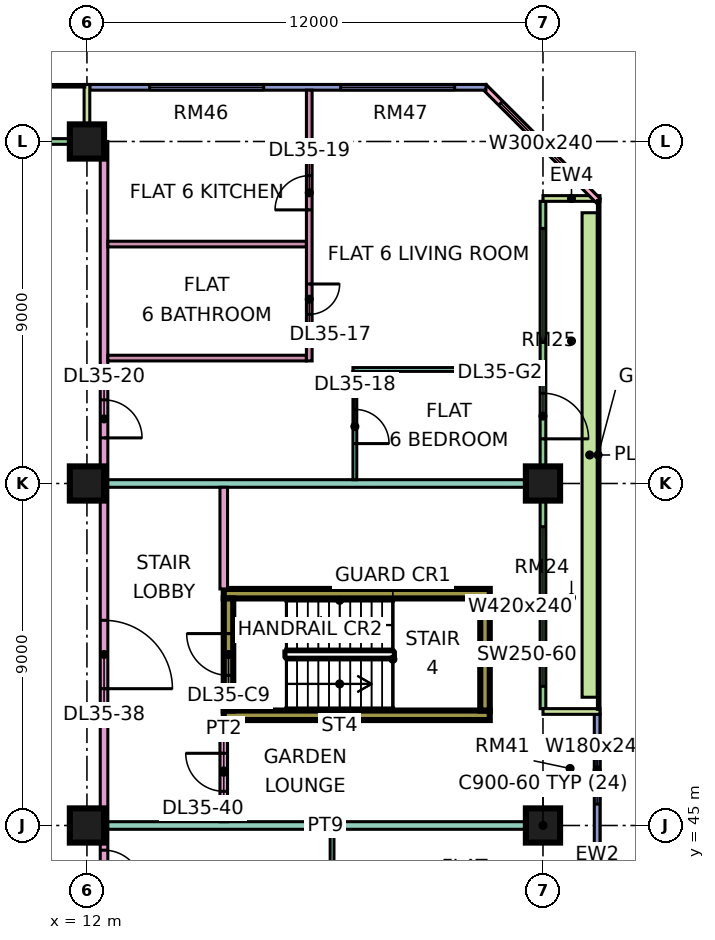
"""IFC4 building model, lengths in metres.
Left out: names, types, materials, properties, quantities, classifications, styles, units other than length and angle.
Written with IfcOpenShell. Run it as: python <this file> out.ifc"""

import sys

from ifc_helpers import new_model, si_unit, direction, frame, frame_2d, origin, origin_2d, place, context, subcontext, project, spatial, rectangle, extrude, element, fill, save


model = new_model("IFC4")
c1 = context("Model", 3, precision=1e-05, world=origin(), true_north=direction((0.0, 1.0)))
c2 = subcontext(c1, "Body", "Model", "MODEL_VIEW")
j1 = project(units=[si_unit("LENGTHUNIT", "METRE"), si_unit("PLANEANGLEUNIT", "RADIAN")], contexts=[c1])
p1 = place(None, origin())
s1 = spatial("IfcSite", under=j1, at=p1, CompositionType="ELEMENT")
p2 = place(p1, origin())
s2 = spatial("IfcBuilding", under=s1, at=p2, CompositionType="ELEMENT")
p3 = place(p2, frame((0.0, 0.0, 157.4)))
s3 = spatial("IfcBuildingStorey", under=s2, at=p3, CompositionType="ELEMENT", Elevation=157.4)
for number, where, z_axis, x_axis in (
    (1, (12.0, 45.0, 0.0), (0.0, 0.0, 1.0), (1.0, 0.0, 0.0)),
    (2, (12.0, 54.0, 0.0), (0.0, 0.0, 1.0), (1.0, 0.0, 0.0)),
    (3, (12.0, 63.0, 0.0), (0.0, 0.0, 1.0), (1.0, 0.0, 0.0)),
    (4, (24.0, 45.0, 0.0), (0.0, 0.0, 1.0), (1.0, 0.0, 0.0)),
    (5, (24.0, 54.0, 0.0), (0.0, 0.0, 1.0), (1.0, 0.0, 0.0)),
):
    element("IfcColumn", number, at=place(p3, frame(where, z_axis=z_axis, x_axis=x_axis)), inside=s3, PredefinedType="COLUMN", context=c2, shape_type="SweptSolid", body=[
        extrude(rectangle(XDim=0.9, YDim=0.9, at=origin_2d()), origin(), (0.0, 0.0, 1.0), 3.75),
    ])
for number, where, z_axis, x_axis in (
    (6, (15.6, 47.9, 0.0), (0.0, 0.0, 1.0), (1.0, 0.0, 0.0)),
    (7, (15.6, 51.1, 0.0), (0.0, 0.0, 1.0), (1.0, 0.0, 0.0)),
):
    element("IfcWall", number, at=place(p3, frame(where, z_axis=z_axis, x_axis=x_axis)), inside=s3, PredefinedType="SHEAR", context=c2, shape_type="SweptSolid", body=[
        extrude(rectangle(XDim=7.0, YDim=0.25, at=frame_2d((3.5, 0.0))), origin(), (0.0, 0.0, 1.0), 3.75),
    ])
p4 = place(p3, frame((15.725, 48.025, 0.0), z_axis=(0.0, 0.0, 1.0), x_axis=(0.0, 1.0, 0.0)))
e8 = element("IfcWall", 8, at=p4, inside=s3, PredefinedType="SHEAR", context=c2, shape_type="SweptSolid", body=[
    extrude(rectangle(XDim=2.95, YDim=0.25, at=frame_2d((1.475, 0.0))), origin(), (0.0, 0.0, 1.0), 3.75),
])
p5 = place(p4, frame((0.925, 0.0, 0.0)))
e9 = element("IfcOpeningElement", 9, at=p5, cuts=e8, PredefinedType="OPENING", context=c2, shape_type="SweptSolid", body=[
    extrude(rectangle(XDim=1.1, YDim=2.2, at=frame_2d((0.55, 1.1))), frame((0.0, 0.135, 0.0), z_axis=(0.0, -1.0, 0.0), x_axis=(1.0, 0.0, 0.0)), (0.0, 0.0, 1.0), 0.27),
])
p6 = place(p3, frame((22.475, 48.025, 0.0), z_axis=(0.0, 0.0, 1.0), x_axis=(0.0, 1.0, 0.0)))
e10 = element("IfcWall", 10, at=p6, inside=s3, PredefinedType="SHEAR", context=c2, shape_type="SweptSolid", body=[
    extrude(rectangle(XDim=2.95, YDim=0.25, at=frame_2d((1.475, 0.0))), origin(), (0.0, 0.0, 1.0), 3.75),
])
p7 = place(p3, frame((25.425, 40.5, 0.0), z_axis=(0.0, 0.0, 1.0), x_axis=(0.0, 1.0, 0.0)))
e11 = element("IfcWall", 11, at=p7, inside=s3, PredefinedType="SOLIDWALL", context=c2, shape_type="SweptSolid", body=[
    extrude(rectangle(XDim=7.425, YDim=0.15, at=frame_2d((3.712, 0.0))), origin(), (0.0, 0.0, 1.0), 3.35),
])
p8 = place(p7, frame((2.1, 0.0, 0.45)))
e12 = element("IfcOpeningElement", 12, at=p8, cuts=e11, PredefinedType="OPENING", context=c2, shape_type="SweptSolid", body=[
    extrude(rectangle(XDim=1.8, YDim=2.4, at=frame_2d((0.9, 1.2))), frame((0.0, 0.085, 0.0), z_axis=(0.0, -1.0, 0.0), x_axis=(1.0, 0.0, 0.0)), (0.0, 0.0, 1.0), 0.17),
])
p9 = place(p7, frame((5.062, 0.0, 0.45)))
e13 = element("IfcOpeningElement", 13, at=p9, cuts=e11, PredefinedType="OPENING", context=c2, shape_type="SweptSolid", body=[
    extrude(rectangle(XDim=1.8, YDim=2.4, at=frame_2d((0.9, 1.2))), frame((0.0, 0.085, 0.0), z_axis=(0.0, -1.0, 0.0), x_axis=(1.0, 0.0, 0.0)), (0.0, 0.0, 1.0), 0.17),
])
p10 = place(p3, frame((24.0, 48.075, 0.0), z_axis=(0.0, 0.0, 1.0), x_axis=(0.0, 1.0, 0.0)))
e14 = element("IfcWall", 14, at=p10, inside=s3, PredefinedType="SOLIDWALL", context=c2, shape_type="SweptSolid", body=[
    extrude(rectangle(XDim=13.35, YDim=0.15, at=frame_2d((6.675, 0.0))), origin(), (0.0, 0.0, 1.0), 3.35),
])
p11 = place(p10, frame((0.587, 0.0, 0.45)))
e15 = element("IfcOpeningElement", 15, at=p11, cuts=e14, PredefinedType="OPENING", context=c2, shape_type="SweptSolid", body=[
    extrude(rectangle(XDim=4.2, YDim=2.4, at=frame_2d((2.1, 1.2))), frame((0.0, 0.085, 0.0), z_axis=(0.0, -1.0, 0.0), x_axis=(1.0, 0.0, 0.0)), (0.0, 0.0, 1.0), 0.17),
])
p12 = place(p10, frame((7.1, 0.0, 0.0)))
e16 = element("IfcOpeningElement", 16, at=p12, cuts=e14, PredefinedType="OPENING", context=c2, shape_type="SweptSolid", body=[
    extrude(rectangle(XDim=1.2, YDim=2.4, at=frame_2d((0.6, 1.2))), frame((0.0, 0.085, 0.0), z_axis=(0.0, -1.0, 0.0), x_axis=(1.0, 0.0, 0.0)), (0.0, 0.0, 1.0), 0.17),
])
p13 = place(p10, frame((9.637, 0.0, 0.45)))
e17 = element("IfcOpeningElement", 17, at=p13, cuts=e14, PredefinedType="OPENING", context=c2, shape_type="SweptSolid", body=[
    extrude(rectangle(XDim=3.0, YDim=2.4, at=frame_2d((1.5, 1.2))), frame((0.0, 0.085, 0.0), z_axis=(0.0, -1.0, 0.0), x_axis=(1.0, 0.0, 0.0)), (0.0, 0.0, 1.0), 0.17),
])
for number, where, z_axis, x_axis in (
    (18, (25.5, 48.0, 0.0), (0.0, 0.0, 1.0), (-1.0, 0.0, 0.0)),
    (19, (25.5, 61.5, 0.0), (0.0, 0.0, 1.0), (-1.0, 0.0, 0.0)),
):
    element("IfcWall", number, at=place(p3, frame(where, z_axis=z_axis, x_axis=x_axis)), inside=s3, PredefinedType="SOLIDWALL", context=c2, shape_type="SweptSolid", body=[
        extrude(rectangle(XDim=1.5, YDim=0.15, at=frame_2d((0.75, 0.0))), origin(), (0.0, 0.0, 1.0), 3.35),
    ])
p14 = place(p3, frame((25.447, 61.447, 0.0), z_axis=(0.0, 0.0, 1.0), x_axis=(-0.707106781187, 0.707106781187, 0.0)))
e20 = element("IfcWall", 20, at=p14, inside=s3, PredefinedType="SOLIDWALL", context=c2, shape_type="SweptSolid", body=[
    extrude(rectangle(XDim=4.243, YDim=0.15, at=frame_2d((2.121, 0.0))), origin(), (0.0, 0.0, 1.0), 3.35),
])
p15 = place(p14, frame((0.621, 0.0, 0.45)))
e21 = element("IfcOpeningElement", 21, at=p15, cuts=e20, PredefinedType="OPENING", context=c2, shape_type="SweptSolid", body=[
    extrude(rectangle(XDim=3.0, YDim=2.4, at=frame_2d((1.5, 1.2))), frame((0.0, 0.085, 0.0), z_axis=(0.0, -1.0, 0.0), x_axis=(1.0, 0.0, 0.0)), (0.0, 0.0, 1.0), 0.17),
])
p16 = place(p3, frame((22.5, 64.425, 0.0), z_axis=(0.0, 0.0, 1.0), x_axis=(-1.0, 0.0, 0.0)))
e22 = element("IfcWall", 22, at=p16, inside=s3, PredefinedType="SOLIDWALL", context=c2, shape_type="SweptSolid", body=[
    extrude(rectangle(XDim=10.425, YDim=0.15, at=frame_2d((5.212, 0.0))), origin(), (0.0, 0.0, 1.0), 3.35),
])
p17 = place(p16, frame((0.825, 0.0, 0.45)))
e23 = element("IfcOpeningElement", 23, at=p17, cuts=e22, PredefinedType="OPENING", context=c2, shape_type="SweptSolid", body=[
    extrude(rectangle(XDim=3.0, YDim=2.4, at=frame_2d((1.5, 1.2))), frame((0.0, 0.085, 0.0), z_axis=(0.0, -1.0, 0.0), x_axis=(1.0, 0.0, 0.0)), (0.0, 0.0, 1.0), 0.17),
])
p18 = place(p16, frame((5.85, 0.0, 0.45)))
e24 = element("IfcOpeningElement", 24, at=p18, cuts=e22, PredefinedType="OPENING", context=c2, shape_type="SweptSolid", body=[
    extrude(rectangle(XDim=3.0, YDim=2.4, at=frame_2d((1.5, 1.2))), frame((0.0, 0.085, 0.0), z_axis=(0.0, -1.0, 0.0), x_axis=(1.0, 0.0, 0.0)), (0.0, 0.0, 1.0), 0.17),
])
p19 = place(p3, frame((11.925, 63.0, 0.0), z_axis=(0.0, 0.0, 1.0), x_axis=(-1.0, 0.0, 0.0)))
e25 = element("IfcWall", 25, at=p19, inside=s3, PredefinedType="SOLIDWALL", context=c2, shape_type="SweptSolid", body=[
    extrude(rectangle(XDim=10.35, YDim=0.15, at=frame_2d((5.175, 0.0))), origin(), (0.0, 0.0, 1.0), 3.35),
])
p20 = place(p19, frame((7.688, 0.0, 0.0)))
e26 = element("IfcOpeningElement", 26, at=p20, cuts=e25, PredefinedType="OPENING", context=c2, shape_type="SweptSolid", body=[
    extrude(rectangle(XDim=1.8, YDim=2.4, at=frame_2d((0.9, 1.2))), frame((0.0, 0.085, 0.0), z_axis=(0.0, -1.0, 0.0), x_axis=(1.0, 0.0, 0.0)), (0.0, 0.0, 1.0), 0.17),
])
p21 = place(p3, frame((12.0, 64.5, 0.0), z_axis=(0.0, 0.0, 1.0), x_axis=(0.0, -1.0, 0.0)))
e27 = element("IfcWall", 27, at=p21, inside=s3, PredefinedType="SOLIDWALL", context=c2, shape_type="SweptSolid", body=[
    extrude(rectangle(XDim=1.5, YDim=0.15, at=frame_2d((0.75, 0.0))), origin(), (0.0, 0.0, 1.0), 3.35),
])
p22 = place(p3, frame((25.229, 48.375, 0.0), z_axis=(0.0, 0.0, 1.0), x_axis=(0.0, 1.0, 0.0)))
e28 = element("IfcWall", 28, at=p22, inside=s3, PredefinedType="SOLIDWALL", context=c2, shape_type="SweptSolid", body=[
    extrude(rectangle(XDim=12.75, YDim=0.4, at=frame_2d((6.375, 0.0))), origin(), (0.0, 0.0, 1.0), 0.7),
])
p23 = place(p3, frame((12.45, 20.0, 0.0), z_axis=(0.0, 0.0, 1.0), x_axis=(0.0, 1.0, 0.0)))
e29 = element("IfcWall", 29, at=p23, inside=s3, PredefinedType="PARTITIONING", context=c2, shape_type="SweptSolid", body=[
    extrude(rectangle(XDim=43.0, YDim=0.2, at=frame_2d((21.5, 0.0))), origin(), (0.0, 0.0, 1.0), 3.35),
])
p24 = place(p23, frame((5.95, 0.0, 0.0)))
e30 = element("IfcOpeningElement", 30, at=p24, cuts=e29, PredefinedType="OPENING", context=c2, shape_type="SweptSolid", body=[
    extrude(rectangle(XDim=1.0, YDim=2.1, at=frame_2d((0.5, 1.05))), frame((0.0, 0.11, 0.0), z_axis=(0.0, -1.0, 0.0), x_axis=(1.0, 0.0, 0.0)), (0.0, 0.0, 1.0), 0.22),
])
p25 = place(p23, frame((12.0, 0.0, 0.0)))
e31 = element("IfcOpeningElement", 31, at=p25, cuts=e29, PredefinedType="OPENING", context=c2, shape_type="SweptSolid", body=[
    extrude(rectangle(XDim=1.0, YDim=2.1, at=frame_2d((0.5, 1.05))), frame((0.0, 0.11, 0.0), z_axis=(0.0, -1.0, 0.0), x_axis=(1.0, 0.0, 0.0)), (0.0, 0.0, 1.0), 0.22),
])
p26 = place(p23, frame((23.35, 0.0, 0.0)))
e32 = element("IfcOpeningElement", 32, at=p26, cuts=e29, PredefinedType="OPENING", context=c2, shape_type="SweptSolid", body=[
    extrude(rectangle(XDim=1.0, YDim=2.1, at=frame_2d((0.5, 1.05))), frame((0.0, 0.11, 0.0), z_axis=(0.0, -1.0, 0.0), x_axis=(1.0, 0.0, 0.0)), (0.0, 0.0, 1.0), 0.22),
])
p27 = place(p23, frame((35.2, 0.0, 0.0)))
e33 = element("IfcOpeningElement", 33, at=p27, cuts=e29, PredefinedType="OPENING", context=c2, shape_type="SweptSolid", body=[
    extrude(rectangle(XDim=1.0, YDim=2.1, at=frame_2d((0.5, 1.05))), frame((0.0, 0.11, 0.0), z_axis=(0.0, -1.0, 0.0), x_axis=(1.0, 0.0, 0.0)), (0.0, 0.0, 1.0), 0.22),
])
p28 = place(p23, frame((1.15, 0.0, 0.0)))
e34 = element("IfcOpeningElement", 34, at=p28, cuts=e29, PredefinedType="OPENING", context=c2, shape_type="SweptSolid", body=[
    extrude(rectangle(XDim=1.8, YDim=2.1, at=frame_2d((0.9, 1.05))), frame((0.0, 0.11, 0.0), z_axis=(0.0, -1.0, 0.0), x_axis=(1.0, 0.0, 0.0)), (0.0, 0.0, 1.0), 0.22),
])
p29 = place(p23, frame((28.6, 0.0, 0.0)))
e35 = element("IfcOpeningElement", 35, at=p29, cuts=e29, PredefinedType="OPENING", context=c2, shape_type="SweptSolid", body=[
    extrude(rectangle(XDim=1.8, YDim=2.1, at=frame_2d((0.9, 1.05))), frame((0.0, 0.11, 0.0), z_axis=(0.0, -1.0, 0.0), x_axis=(1.0, 0.0, 0.0)), (0.0, 0.0, 1.0), 0.22),
])
p30 = place(p3, frame((12.55, 45.0, 0.0), z_axis=(0.0, 0.0, 1.0), x_axis=(1.0, 0.0, 0.0)))
e36 = element("IfcWall", 36, at=p30, inside=s3, PredefinedType="PARTITIONING", context=c2, shape_type="SweptSolid", body=[
    extrude(rectangle(XDim=11.45, YDim=0.2, at=frame_2d((5.725, 0.0))), origin(), (0.0, 0.0, 1.0), 3.35),
])
p31 = place(p3, frame((12.55, 54.0, 0.0), z_axis=(0.0, 0.0, 1.0), x_axis=(1.0, 0.0, 0.0)))
e37 = element("IfcWall", 37, at=p31, inside=s3, PredefinedType="PARTITIONING", context=c2, shape_type="SweptSolid", body=[
    extrude(rectangle(XDim=11.376, YDim=0.2, at=frame_2d((5.688, 0.0))), origin(), (0.0, 0.0, 1.0), 3.35),
])
for number, where, z_axis, x_axis in (
    (38, (12.55, 57.3, 0.0), (0.0, 0.0, 1.0), (1.0, 0.0, 0.0)),
    (39, (12.55, 60.3, 0.0), (0.0, 0.0, 1.0), (1.0, 0.0, 0.0)),
):
    element("IfcWall", number, at=place(p3, frame(where, z_axis=z_axis, x_axis=x_axis)), inside=s3, PredefinedType="PARTITIONING", context=c2, shape_type="SweptSolid", body=[
        extrude(rectangle(XDim=5.225, YDim=0.15, at=frame_2d((2.612, 0.0))), origin(), (0.0, 0.0, 1.0), 3.35),
    ])
p32 = place(p3, frame((15.6, 45.1, 0.0), z_axis=(0.0, 0.0, 1.0), x_axis=(0.0, 1.0, 0.0)))
e40 = element("IfcWall", 40, at=p32, inside=s3, PredefinedType="PARTITIONING", context=c2, shape_type="SweptSolid", body=[
    extrude(rectangle(XDim=2.675, YDim=0.2, at=frame_2d((1.337, 0.0))), origin(), (0.0, 0.0, 1.0), 3.35),
])
p33 = place(p32, frame((0.8, 0.0, 0.0)))
e41 = element("IfcOpeningElement", 41, at=p33, cuts=e40, PredefinedType="OPENING", context=c2, shape_type="SweptSolid", body=[
    extrude(rectangle(XDim=1.0, YDim=2.1, at=frame_2d((0.5, 1.05))), frame((0.0, 0.11, 0.0), z_axis=(0.0, -1.0, 0.0), x_axis=(1.0, 0.0, 0.0)), (0.0, 0.0, 1.0), 0.22),
])
p34 = place(p3, frame((15.6, 51.225, 0.0), z_axis=(0.0, 0.0, 1.0), x_axis=(0.0, 1.0, 0.0)))
e42 = element("IfcWall", 42, at=p34, inside=s3, PredefinedType="PARTITIONING", context=c2, shape_type="SweptSolid", body=[
    extrude(rectangle(XDim=2.675, YDim=0.2, at=frame_2d((1.337, 0.0))), origin(), (0.0, 0.0, 1.0), 3.35),
])
p35 = place(p3, frame((17.85, 57.225, 0.0), z_axis=(0.0, 0.0, 1.0), x_axis=(0.0, 1.0, 0.0)))
e43 = element("IfcWall", 43, at=p35, inside=s3, PredefinedType="PARTITIONING", context=c2, shape_type="SweptSolid", body=[
    extrude(rectangle(XDim=7.125, YDim=0.15, at=frame_2d((3.562, 0.0))), origin(), (0.0, 0.0, 1.0), 3.35),
])
p36 = place(p35, frame((1.225, 0.0, 0.0)))
e44 = element("IfcOpeningElement", 44, at=p36, cuts=e43, PredefinedType="OPENING", context=c2, shape_type="SweptSolid", body=[
    extrude(rectangle(XDim=0.8, YDim=2.1, at=frame_2d((0.4, 1.05))), frame((0.0, 0.085, 0.0), z_axis=(0.0, -1.0, 0.0), x_axis=(1.0, 0.0, 0.0)), (0.0, 0.0, 1.0), 0.17),
])
p37 = place(p35, frame((3.975, 0.0, 0.0)))
e45 = element("IfcOpeningElement", 45, at=p37, cuts=e43, PredefinedType="OPENING", context=c2, shape_type="SweptSolid", body=[
    extrude(rectangle(XDim=0.9, YDim=2.1, at=frame_2d((0.45, 1.05))), frame((0.0, 0.085, 0.0), z_axis=(0.0, -1.0, 0.0), x_axis=(1.0, 0.0, 0.0)), (0.0, 0.0, 1.0), 0.17),
])
p38 = place(p3, frame((18.45, 42.05, 0.0), z_axis=(0.0, 0.0, 1.0), x_axis=(0.0, 1.0, 0.0)))
e46 = element("IfcWall", 46, at=p38, inside=s3, PredefinedType="PARTITIONING", context=c2, shape_type="SweptSolid", body=[
    extrude(rectangle(XDim=2.85, YDim=0.1, at=frame_2d((1.425, 0.0))), origin(), (0.0, 0.0, 1.0), 3.35),
])
p39 = place(p38, frame((1.0, 0.0, 0.0)))
e47 = element("IfcOpeningElement", 47, at=p39, cuts=e46, PredefinedType="OPENING", context=c2, shape_type="SweptSolid", body=[
    extrude(rectangle(XDim=0.9, YDim=2.1, at=frame_2d((0.45, 1.05))), frame((0.0, 0.06, 0.0), z_axis=(0.0, -1.0, 0.0), x_axis=(1.0, 0.0, 0.0)), (0.0, 0.0, 1.0), 0.12),
])
p40 = place(p3, frame((19.0, 57.0, 0.0), z_axis=(0.0, 0.0, 1.0), x_axis=(1.0, 0.0, 0.0)))
e48 = element("IfcWall", 48, at=p40, inside=s3, PredefinedType="PARTITIONING", context=c2, shape_type="SweptSolid", body=[
    extrude(rectangle(XDim=4.926, YDim=0.1, at=frame_2d((2.463, 0.0))), origin(), (0.0, 0.0, 1.0), 3.35),
])
p41 = place(p3, frame((19.05, 54.1, 0.0), z_axis=(0.0, 0.0, 1.0), x_axis=(0.0, 1.0, 0.0)))
e49 = element("IfcWall", 49, at=p41, inside=s3, PredefinedType="PARTITIONING", context=c2, shape_type="SweptSolid", body=[
    extrude(rectangle(XDim=2.85, YDim=0.1, at=frame_2d((1.425, 0.0))), origin(), (0.0, 0.0, 1.0), 3.35),
])
p42 = place(p41, frame((0.95, 0.0, 0.0)))
e50 = element("IfcOpeningElement", 50, at=p42, cuts=e49, PredefinedType="OPENING", context=c2, shape_type="SweptSolid", body=[
    extrude(rectangle(XDim=0.9, YDim=2.1, at=frame_2d((0.45, 1.05))), frame((0.0, 0.06, 0.0), z_axis=(0.0, -1.0, 0.0), x_axis=(1.0, 0.0, 0.0)), (0.0, 0.0, 1.0), 0.12),
])
p43 = place(p8, origin())
e51 = element("IfcWindow", 51, at=p43, inside=s3, PartitioningType="SINGLE_PANEL", PredefinedType="WINDOW", context=c2, shape_type="SweptSolid", body=[
    extrude(rectangle(XDim=1.8, YDim=2.4, at=frame_2d((0.9, 1.2))), frame((0.0, 0.03, 0.0), z_axis=(0.0, -1.0, 0.0), x_axis=(1.0, 0.0, 0.0)), (0.0, 0.0, 1.0), 0.06),
])
fill(e12, e51)
p44 = place(p9, origin())
e52 = element("IfcWindow", 52, at=p44, inside=s3, PartitioningType="SINGLE_PANEL", PredefinedType="WINDOW", context=c2, shape_type="SweptSolid", body=[
    extrude(rectangle(XDim=1.8, YDim=2.4, at=frame_2d((0.9, 1.2))), frame((0.0, 0.03, 0.0), z_axis=(0.0, -1.0, 0.0), x_axis=(1.0, 0.0, 0.0)), (0.0, 0.0, 1.0), 0.06),
])
fill(e13, e52)
p45 = place(p11, origin())
e53 = element("IfcWindow", 53, at=p45, inside=s3, PartitioningType="SINGLE_PANEL", PredefinedType="WINDOW", context=c2, shape_type="SweptSolid", body=[
    extrude(rectangle(XDim=4.2, YDim=2.4, at=frame_2d((2.1, 1.2))), frame((0.0, 0.03, 0.0), z_axis=(0.0, -1.0, 0.0), x_axis=(1.0, 0.0, 0.0)), (0.0, 0.0, 1.0), 0.06),
])
fill(e15, e53)
p46 = place(p12, frame((1.2, 0.0, 0.0), z_axis=(0.0, 0.0, 1.0), x_axis=(-1.0, 0.0, 0.0)))
e54 = element("IfcDoor", 54, at=p46, inside=s3, OperationType="DOUBLE_DOOR_SINGLE_SWING", PredefinedType="DOOR", context=c2, shape_type="SweptSolid", body=[
    extrude(rectangle(XDim=1.2, YDim=2.4, at=frame_2d((0.6, 1.2))), frame((0.0, 0.025, 0.0), z_axis=(0.0, -1.0, 0.0), x_axis=(1.0, 0.0, 0.0)), (0.0, 0.0, 1.0), 0.05),
])
fill(e16, e54)
p47 = place(p13, origin())
e55 = element("IfcWindow", 55, at=p47, inside=s3, PartitioningType="SINGLE_PANEL", PredefinedType="WINDOW", context=c2, shape_type="SweptSolid", body=[
    extrude(rectangle(XDim=3.0, YDim=2.4, at=frame_2d((1.5, 1.2))), frame((0.0, 0.03, 0.0), z_axis=(0.0, -1.0, 0.0), x_axis=(1.0, 0.0, 0.0)), (0.0, 0.0, 1.0), 0.06),
])
fill(e17, e55)
p48 = place(p15, origin())
e56 = element("IfcWindow", 56, at=p48, inside=s3, PartitioningType="SINGLE_PANEL", PredefinedType="WINDOW", context=c2, shape_type="SweptSolid", body=[
    extrude(rectangle(XDim=3.0, YDim=2.4, at=frame_2d((1.5, 1.2))), frame((0.0, 0.03, 0.0), z_axis=(0.0, -1.0, 0.0), x_axis=(1.0, 0.0, 0.0)), (0.0, 0.0, 1.0), 0.06),
])
fill(e21, e56)
p49 = place(p17, origin())
e57 = element("IfcWindow", 57, at=p49, inside=s3, PartitioningType="SINGLE_PANEL", PredefinedType="WINDOW", context=c2, shape_type="SweptSolid", body=[
    extrude(rectangle(XDim=3.0, YDim=2.4, at=frame_2d((1.5, 1.2))), frame((0.0, 0.03, 0.0), z_axis=(0.0, -1.0, 0.0), x_axis=(1.0, 0.0, 0.0)), (0.0, 0.0, 1.0), 0.06),
])
fill(e23, e57)
p50 = place(p18, origin())
e58 = element("IfcWindow", 58, at=p50, inside=s3, PartitioningType="SINGLE_PANEL", PredefinedType="WINDOW", context=c2, shape_type="SweptSolid", body=[
    extrude(rectangle(XDim=3.0, YDim=2.4, at=frame_2d((1.5, 1.2))), frame((0.0, 0.03, 0.0), z_axis=(0.0, -1.0, 0.0), x_axis=(1.0, 0.0, 0.0)), (0.0, 0.0, 1.0), 0.06),
])
fill(e24, e58)
p51 = place(p5, frame((1.1, 0.0, 0.0), z_axis=(0.0, 0.0, 1.0), x_axis=(-1.0, 0.0, 0.0)))
e59 = element("IfcDoor", 59, at=p51, inside=s3, OperationType="SINGLE_SWING_RIGHT", PredefinedType="DOOR", context=c2, shape_type="SweptSolid", body=[
    extrude(rectangle(XDim=1.1, YDim=2.2, at=frame_2d((0.55, 1.1))), frame((0.0, 0.025, 0.0), z_axis=(0.0, -1.0, 0.0), x_axis=(1.0, 0.0, 0.0)), (0.0, 0.0, 1.0), 0.05),
])
fill(e9, e59)
p52 = place(p26, frame((1.0, 0.0, 0.0), z_axis=(0.0, 0.0, 1.0), x_axis=(-1.0, 0.0, 0.0)))
e60 = element("IfcDoor", 60, at=p52, inside=s3, OperationType="SINGLE_SWING_LEFT", PredefinedType="DOOR", context=c2, shape_type="SweptSolid", body=[
    extrude(rectangle(XDim=1.0, YDim=2.1, at=frame_2d((0.5, 1.05))), frame((0.0, 0.025, 0.0), z_axis=(0.0, -1.0, 0.0), x_axis=(1.0, 0.0, 0.0)), (0.0, 0.0, 1.0), 0.05),
])
fill(e32, e60)
p53 = place(p36, origin())
e61 = element("IfcDoor", 61, at=p53, inside=s3, OperationType="SINGLE_SWING_RIGHT", PredefinedType="DOOR", context=c2, shape_type="SweptSolid", body=[
    extrude(rectangle(XDim=0.8, YDim=2.1, at=frame_2d((0.4, 1.05))), frame((0.0, 0.025, 0.0), z_axis=(0.0, -1.0, 0.0), x_axis=(1.0, 0.0, 0.0)), (0.0, 0.0, 1.0), 0.05),
])
fill(e44, e61)
p54 = place(p42, frame((0.9, 0.0, 0.0), z_axis=(0.0, 0.0, 1.0), x_axis=(-1.0, 0.0, 0.0)))
e62 = element("IfcDoor", 62, at=p54, inside=s3, OperationType="SINGLE_SWING_LEFT", PredefinedType="DOOR", context=c2, shape_type="SweptSolid", body=[
    extrude(rectangle(XDim=0.9, YDim=2.1, at=frame_2d((0.45, 1.05))), frame((0.0, 0.025, 0.0), z_axis=(0.0, -1.0, 0.0), x_axis=(1.0, 0.0, 0.0)), (0.0, 0.0, 1.0), 0.05),
])
fill(e50, e62)
p55 = place(p37, origin())
e63 = element("IfcDoor", 63, at=p55, inside=s3, OperationType="SINGLE_SWING_LEFT", PredefinedType="DOOR", context=c2, shape_type="SweptSolid", body=[
    extrude(rectangle(XDim=0.9, YDim=2.1, at=frame_2d((0.45, 1.05))), frame((0.0, 0.025, 0.0), z_axis=(0.0, -1.0, 0.0), x_axis=(1.0, 0.0, 0.0)), (0.0, 0.0, 1.0), 0.05),
])
fill(e45, e63)
p56 = place(p27, frame((1.0, 0.0, 0.0), z_axis=(0.0, 0.0, 1.0), x_axis=(-1.0, 0.0, 0.0)))
e64 = element("IfcDoor", 64, at=p56, inside=s3, OperationType="SINGLE_SWING_LEFT", PredefinedType="DOOR", context=c2, shape_type="SweptSolid", body=[
    extrude(rectangle(XDim=1.0, YDim=2.1, at=frame_2d((0.5, 1.05))), frame((0.0, 0.025, 0.0), z_axis=(0.0, -1.0, 0.0), x_axis=(1.0, 0.0, 0.0)), (0.0, 0.0, 1.0), 0.05),
])
fill(e33, e64)
p57 = place(p29, frame((1.8, 0.0, 0.0), z_axis=(0.0, 0.0, 1.0), x_axis=(-1.0, 0.0, 0.0)))
e65 = element("IfcDoor", 65, at=p57, inside=s3, OperationType="DOUBLE_DOOR_SINGLE_SWING", PredefinedType="DOOR", context=c2, shape_type="SweptSolid", body=[
    extrude(rectangle(XDim=1.8, YDim=2.1, at=frame_2d((0.9, 1.05))), frame((0.0, 0.025, 0.0), z_axis=(0.0, -1.0, 0.0), x_axis=(1.0, 0.0, 0.0)), (0.0, 0.0, 1.0), 0.05),
])
fill(e35, e65)
p58 = place(p33, frame((1.0, 0.0, 0.0), z_axis=(0.0, 0.0, 1.0), x_axis=(-1.0, 0.0, 0.0)))
e66 = element("IfcDoor", 66, at=p58, inside=s3, OperationType="SINGLE_SWING_RIGHT", PredefinedType="DOOR", context=c2, shape_type="SweptSolid", body=[
    extrude(rectangle(XDim=1.0, YDim=2.1, at=frame_2d((0.5, 1.05))), frame((0.0, 0.025, 0.0), z_axis=(0.0, -1.0, 0.0), x_axis=(1.0, 0.0, 0.0)), (0.0, 0.0, 1.0), 0.05),
])
fill(e41, e66)
save(model, sys.argv[1])
